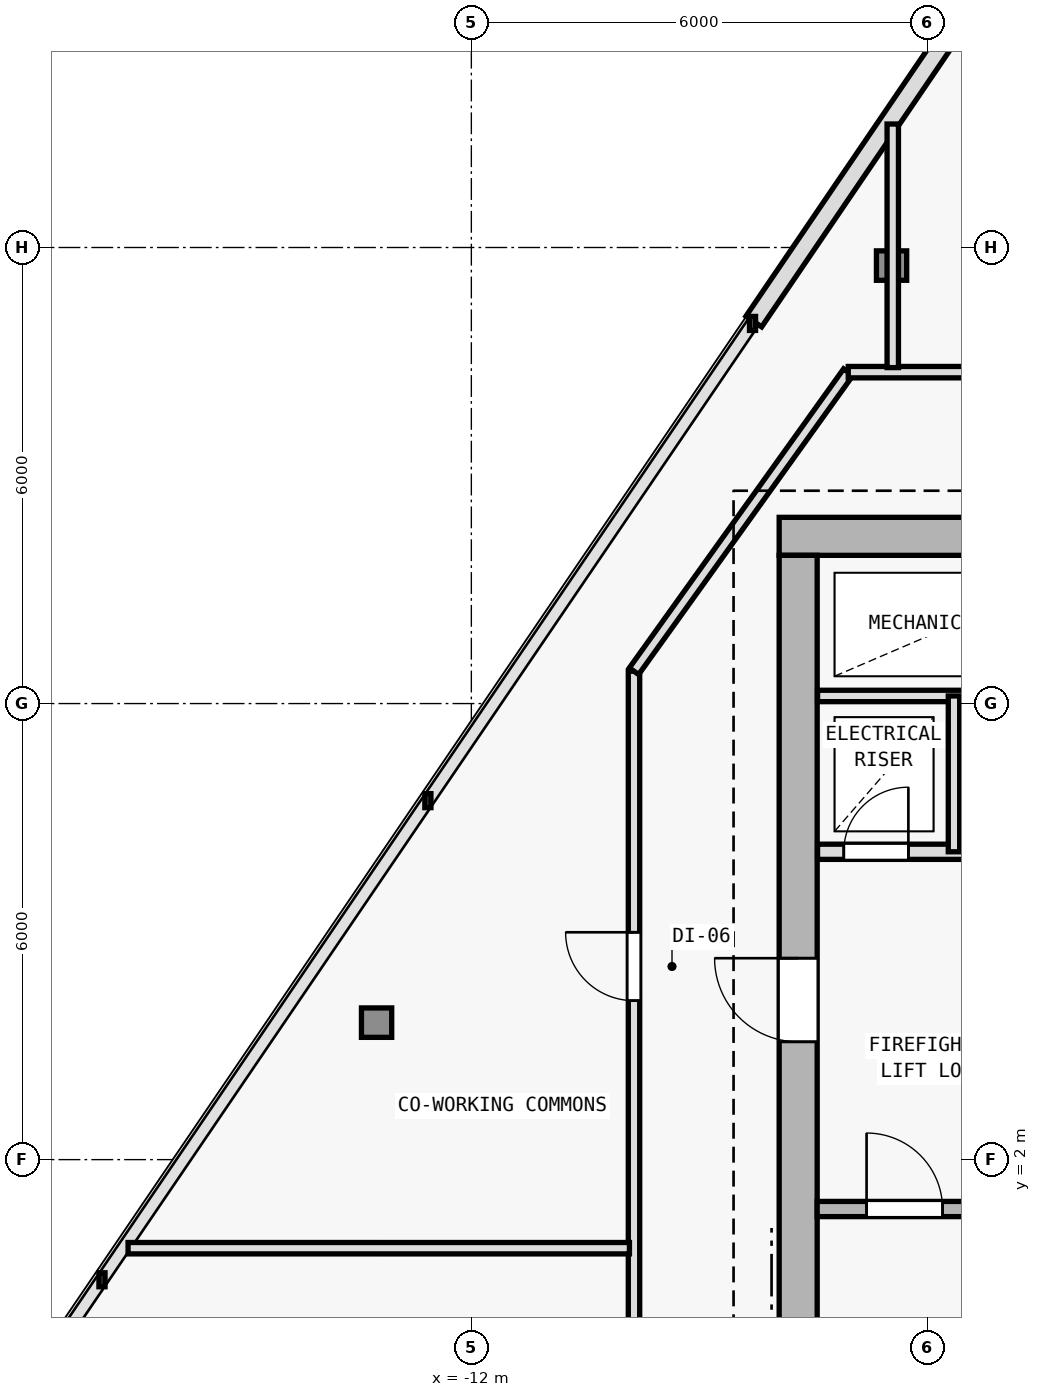
"""IFC4 building model, lengths in metres.
Left out: names, types, materials, properties, quantities, classifications, styles, units other than length and angle.
Written with IfcOpenShell. Run it as: python <this file> out.ifc"""

import sys

from ifc_helpers import new_model, si_unit, direction, frame, frame_2d, origin, origin_2d, place, context, subcontext, project, spatial, rectangle, i_section, extrude, element, fill, save


model = new_model("IFC4")
c1 = context("Model", 3, precision=1e-05, world=origin(), true_north=direction((0.0, 1.0)))
c2 = subcontext(c1, "Body", "Model", "MODEL_VIEW")
j1 = project(units=[si_unit("LENGTHUNIT", "METRE"), si_unit("PLANEANGLEUNIT", "RADIAN")], contexts=[c1])
p1 = place(None, origin())
s1 = spatial("IfcSite", under=j1, at=p1, CompositionType="ELEMENT")
p2 = place(p1, origin())
s2 = spatial("IfcBuilding", under=s1, at=p2, CompositionType="ELEMENT")
p3 = place(p2, frame((0.0, 0.0, 205.5)))
s3 = spatial("IfcBuildingStorey", under=s2, at=p3, CompositionType="ELEMENT", Elevation=205.5)
for number, where, z_axis, x_axis in (
    (1, (-7.7, 10.2, 0.0), (0.0, 0.0, 1.0), (1.0, 0.0, 0.0)),
    (2, (-7.7, 2.0, 0.0), (0.0, 0.0, 1.0), (1.0, 0.0, 0.0)),
):
    element("IfcColumn", number, at=place(p3, frame(where, z_axis=z_axis, x_axis=x_axis)), inside=s3, PredefinedType="COLUMN", context=c2, shape_type="SweptSolid", body=[
        extrude(i_section(OverallWidth=0.398, OverallDepth=0.387, WebThickness=0.013, FlangeThickness=0.022, FilletRadius=0.015, at=origin_2d()), origin(), (0.0, 0.0, 1.0), 3.6),
    ])
p4 = place(p3, frame((-6.471, 13.762, 0.006), z_axis=(0.008775143007, -0.002584925847, 0.999958156636), x_axis=(0.282568886397, 0.959247009086, 0.0)))
e3 = element("IfcColumn", 3, at=p4, inside=s3, PredefinedType="COLUMN", context=c2, shape_type="SweptSolid", body=[
    extrude(i_section(OverallWidth=0.398, OverallDepth=0.387, WebThickness=0.013, FlangeThickness=0.022, FilletRadius=0.015, at=origin_2d()), origin(), (0.0, 0.0, 1.0), 3.589),
])
p5 = place(p3, frame((-13.247, 3.802, 0.006), z_axis=(0.017003572908, 0.009522000828, 0.999810086971), x_axis=(-0.488603368932, 0.87250601595, 0.0)))
e4 = element("IfcColumn", 4, at=p5, inside=s3, PredefinedType="COLUMN", context=c2, shape_type="SweptSolid", body=[
    extrude(i_section(OverallWidth=0.398, OverallDepth=0.387, WebThickness=0.013, FlangeThickness=0.022, FilletRadius=0.015, at=origin_2d()), origin(), (0.0, 0.0, 1.0), 3.59),
])
p6 = place(p3, frame((-8.284, 13.026, 0.0), z_axis=(0.0, 0.0, 1.0), x_axis=(0.562468945091, 0.826818411629, 0.0)))
e5 = element("IfcWall", 5, at=p6, inside=s3, PredefinedType="SOLIDWALL", context=c2, shape_type="SweptSolid", body=[
    extrude(rectangle(XDim=10.714, YDim=0.25, at=frame_2d((5.357, 0.0))), origin(), (0.0, 0.0, 1.0), 3.35),
])
p7 = place(p6, frame((4.557, 0.0, 0.62)))
e6 = element("IfcOpeningElement", 6, at=p7, cuts=e5, PredefinedType="OPENING", context=c2, shape_type="SweptSolid", body=[
    extrude(rectangle(XDim=1.6, YDim=2.1, at=frame_2d((0.8, 1.05))), frame((0.0, 0.135, 0.0), z_axis=(0.0, -1.0, 0.0), x_axis=(1.0, 0.0, 0.0)), (0.0, 0.0, 1.0), 0.27),
])
p8 = place(p3, frame((7.95, 10.2, 0.0), z_axis=(0.0, 0.0, 1.0), x_axis=(-1.0, 0.0, 0.0)))
e7 = element("IfcWall", 7, at=p8, inside=s3, PredefinedType="SHEAR", context=c2, shape_type="SweptSolid", body=[
    extrude(rectangle(XDim=15.9, YDim=0.5, at=frame_2d((7.95, 0.0))), origin(), (0.0, 0.0, 1.0), 3.35),
])
p9 = place(p8, frame((4.4, 0.0, 0.0)))
e8 = element("IfcOpeningElement", 8, at=p9, cuts=e7, PredefinedType="OPENING", context=c2, shape_type="SweptSolid", body=[
    extrude(rectangle(XDim=1.1, YDim=2.15, at=frame_2d((0.55, 1.075))), frame((0.0, 0.26, 0.0), z_axis=(0.0, -1.0, 0.0), x_axis=(1.0, 0.0, 0.0)), (0.0, 0.0, 1.0), 0.52),
])
p10 = place(p3, frame((-7.7, -9.15, 0.0), z_axis=(0.0, 0.0, 1.0), x_axis=(0.0, 1.0, 0.0)))
e9 = element("IfcWall", 9, at=p10, inside=s3, PredefinedType="SHEAR", context=c2, shape_type="SweptSolid", body=[
    extrude(rectangle(XDim=19.1, YDim=0.5, at=frame_2d((9.55, 0.0))), origin(), (0.0, 0.0, 1.0), 3.35),
])
p11 = place(p10, frame((12.7, 0.0, 0.0)))
e10 = element("IfcOpeningElement", 10, at=p11, cuts=e9, PredefinedType="OPENING", context=c2, shape_type="SweptSolid", body=[
    extrude(rectangle(XDim=1.1, YDim=2.15, at=frame_2d((0.55, 1.075))), frame((0.0, 0.26, 0.0), z_axis=(0.0, -1.0, 0.0), x_axis=(1.0, 0.0, 0.0)), (0.0, 0.0, 1.0), 0.52),
])
p12 = place(p3, frame((-7.45, 1.35, 0.0), z_axis=(0.0, 0.0, 1.0), x_axis=(1.0, 0.0, 0.0)))
e11 = element("IfcWall", 11, at=p12, inside=s3, PredefinedType="SOLIDWALL", context=c2, shape_type="SweptSolid", body=[
    extrude(rectangle(XDim=3.4, YDim=0.2, at=frame_2d((1.7, 0.0))), origin(), (0.0, 0.0, 1.0), 3.35),
])
p13 = place(p12, frame((0.65, 0.0, 0.0)))
e12 = element("IfcOpeningElement", 12, at=p13, cuts=e11, PredefinedType="OPENING", context=c2, shape_type="SweptSolid", body=[
    extrude(rectangle(XDim=1.0, YDim=2.15, at=frame_2d((0.5, 1.075))), frame((0.0, 0.11, 0.0), z_axis=(0.0, -1.0, 0.0), x_axis=(1.0, 0.0, 0.0)), (0.0, 0.0, 1.0), 0.22),
])
p14 = place(p3, frame((-7.445, 6.05, 0.0), z_axis=(0.0, 0.0, 1.0), x_axis=(1.0, 0.0, 0.0)))
e13 = element("IfcWall", 13, at=p14, inside=s3, PredefinedType="SOLIDWALL", context=c2, shape_type="SweptSolid", body=[
    extrude(rectangle(XDim=3.595, YDim=0.2, at=frame_2d((1.797, 0.0))), origin(), (0.0, 0.0, 1.0), 3.35),
])
p15 = place(p14, frame((0.345, 0.0, 0.0)))
e14 = element("IfcOpeningElement", 14, at=p15, cuts=e13, PredefinedType="OPENING", context=c2, shape_type="SweptSolid", body=[
    extrude(rectangle(XDim=0.85, YDim=2.1, at=frame_2d((0.425, 1.05))), frame((0.0, 0.11, 0.0), z_axis=(0.0, -1.0, 0.0), x_axis=(1.0, 0.0, 0.0)), (0.0, 0.0, 1.0), 0.22),
])
p16 = place(p14, frame((2.145, 0.0, 0.0)))
e15 = element("IfcOpeningElement", 15, at=p16, cuts=e13, PredefinedType="OPENING", context=c2, shape_type="SweptSolid", body=[
    extrude(rectangle(XDim=0.85, YDim=2.1, at=frame_2d((0.425, 1.05))), frame((0.0, 0.11, 0.0), z_axis=(0.0, -1.0, 0.0), x_axis=(1.0, 0.0, 0.0)), (0.0, 0.0, 1.0), 0.22),
])
p17 = place(p3, frame((-7.445, 8.1, 0.0), z_axis=(0.0, 0.0, 1.0), x_axis=(1.0, 0.0, 0.0)))
e16 = element("IfcWall", 16, at=p17, inside=s3, PredefinedType="PARTITIONING", context=c2, shape_type="SweptSolid", body=[
    extrude(rectangle(XDim=3.595, YDim=0.15, at=frame_2d((1.797, 0.0))), origin(), (0.0, 0.0, 1.0), 3.35),
])
p18 = place(p3, frame((-5.65, 6.05, 0.0), z_axis=(0.0, 0.0, 1.0), x_axis=(0.0, 1.0, 0.0)))
e17 = element("IfcWall", 17, at=p18, inside=s3, PredefinedType="PARTITIONING", context=c2, shape_type="SweptSolid", body=[
    extrude(rectangle(XDim=2.05, YDim=0.15, at=frame_2d((1.025, 0.0))), origin(), (0.0, 0.0, 1.0), 3.35),
])
p19 = place(p3, frame((-9.86, -11.56, 0.0), z_axis=(0.0, 0.0, 1.0), x_axis=(0.0, 1.0, 0.0)))
e18 = element("IfcWall", 18, at=p19, inside=s3, PredefinedType="PARTITIONING", context=c2, shape_type="SweptSolid", body=[
    extrude(rectangle(XDim=19.986, YDim=0.15, at=frame_2d((9.993, 0.0))), origin(), (0.0, 0.0, 1.0), 2.825),
])
p20 = place(p19, frame((8.468, 0.0, 0.0)))
e19 = element("IfcOpeningElement", 19, at=p20, cuts=e18, PredefinedType="OPENING", context=c2, shape_type="SweptSolid", body=[
    extrude(rectangle(XDim=0.9, YDim=2.1, at=frame_2d((0.45, 1.05))), frame((0.0, 0.085, 0.0), z_axis=(0.0, -1.0, 0.0), x_axis=(1.0, 0.0, 0.0)), (0.0, 0.0, 1.0), 0.17),
])
p21 = place(p19, frame((4.38, 0.0, 0.0)))
e20 = element("IfcOpeningElement", 20, at=p21, cuts=e18, PredefinedType="OPENING", context=c2, shape_type="SweptSolid", body=[
    extrude(rectangle(XDim=0.85, YDim=2.1, at=frame_2d((0.425, 1.05))), frame((0.0, 0.085, 0.0), z_axis=(0.0, -1.0, 0.0), x_axis=(1.0, 0.0, 0.0)), (0.0, 0.0, 1.0), 0.17),
])
p22 = place(p19, frame((3.071, 0.0, 0.0)))
e21 = element("IfcOpeningElement", 21, at=p22, cuts=e18, PredefinedType="OPENING", context=c2, shape_type="SweptSolid", body=[
    extrude(rectangle(XDim=0.85, YDim=2.1, at=frame_2d((0.425, 1.05))), frame((0.0, 0.085, 0.0), z_axis=(0.0, -1.0, 0.0), x_axis=(1.0, 0.0, 0.0)), (0.0, 0.0, 1.0), 0.17),
])
p23 = place(p19, frame((1.051, 0.0, 0.0)))
e22 = element("IfcOpeningElement", 22, at=p23, cuts=e18, PredefinedType="OPENING", context=c2, shape_type="SweptSolid", body=[
    extrude(rectangle(XDim=0.9, YDim=2.1, at=frame_2d((0.45, 1.05))), frame((0.0, 0.085, 0.0), z_axis=(0.0, -1.0, 0.0), x_axis=(1.0, 0.0, 0.0)), (0.0, 0.0, 1.0), 0.17),
])
p24 = place(p19, frame((15.651, 0.0, 0.0)))
e23 = element("IfcOpeningElement", 23, at=p24, cuts=e18, PredefinedType="OPENING", context=c2, shape_type="SweptSolid", body=[
    extrude(rectangle(XDim=0.9, YDim=2.1, at=frame_2d((0.45, 1.05))), frame((0.0, 0.085, 0.0), z_axis=(0.0, -1.0, 0.0), x_axis=(1.0, 0.0, 0.0)), (0.0, 0.0, 1.0), 0.17),
])
p25 = place(p3, frame((-9.86, 8.426, 0.0), z_axis=(0.0, 0.0, 1.0), x_axis=(0.582449511476, 0.812866881218, 0.0)))
e24 = element("IfcWall", 24, at=p25, inside=s3, PredefinedType="PARTITIONING", context=c2, shape_type="SweptSolid", body=[
    extrude(rectangle(XDim=4.84, YDim=0.15, at=frame_2d((2.42, 0.0))), origin(), (0.0, 0.0, 1.0), 2.975),
])
p26 = place(p3, frame((-7.041, 12.36, 0.0), z_axis=(0.0, 0.0, 1.0), x_axis=(1.0, 0.0, 0.0)))
e25 = element("IfcWall", 25, at=p26, inside=s3, PredefinedType="PARTITIONING", context=c2, shape_type="SweptSolid", body=[
    extrude(rectangle(XDim=14.064, YDim=0.15, at=frame_2d((7.032, 0.0))), origin(), (0.0, 0.0, 1.0), 2.975),
])
p27 = place(p26, frame((12.272, 0.0, 0.0)))
e26 = element("IfcOpeningElement", 26, at=p27, cuts=e25, PredefinedType="OPENING", context=c2, shape_type="SweptSolid", body=[
    extrude(rectangle(XDim=0.9, YDim=2.1, at=frame_2d((0.45, 1.05))), frame((0.0, 0.085, 0.0), z_axis=(0.0, -1.0, 0.0), x_axis=(1.0, 0.0, 0.0)), (0.0, 0.0, 1.0), 0.17),
])
p28 = place(p26, frame((9.449, 0.0, 0.0)))
e27 = element("IfcOpeningElement", 27, at=p28, cuts=e25, PredefinedType="OPENING", context=c2, shape_type="SweptSolid", body=[
    extrude(rectangle(XDim=0.9, YDim=2.1, at=frame_2d((0.45, 1.05))), frame((0.0, 0.085, 0.0), z_axis=(0.0, -1.0, 0.0), x_axis=(1.0, 0.0, 0.0)), (0.0, 0.0, 1.0), 0.17),
])
p29 = place(p26, frame((6.614, 0.0, 0.0)))
e28 = element("IfcOpeningElement", 28, at=p29, cuts=e25, PredefinedType="OPENING", context=c2, shape_type="SweptSolid", body=[
    extrude(rectangle(XDim=0.9, YDim=2.1, at=frame_2d((0.45, 1.05))), frame((0.0, 0.085, 0.0), z_axis=(0.0, -1.0, 0.0), x_axis=(1.0, 0.0, 0.0)), (0.0, 0.0, 1.0), 0.17),
])
p30 = place(p26, frame((2.786, 0.0, 0.0)))
e29 = element("IfcOpeningElement", 29, at=p30, cuts=e25, PredefinedType="OPENING", context=c2, shape_type="SweptSolid", body=[
    extrude(rectangle(XDim=0.9, YDim=2.1, at=frame_2d((0.45, 1.05))), frame((0.0, 0.085, 0.0), z_axis=(0.0, -1.0, 0.0), x_axis=(1.0, 0.0, 0.0)), (0.0, 0.0, 1.0), 0.17),
])
p31 = place(p3, frame((-6.456, 12.42, 0.0), z_axis=(0.0, 0.0, 1.0), x_axis=(0.0, 1.0, 0.0)))
e30 = element("IfcWall", 30, at=p31, inside=s3, PredefinedType="PARTITIONING", context=c2, shape_type="SweptSolid", body=[
    extrude(rectangle(XDim=3.205, YDim=0.15, at=frame_2d((1.602, 0.0))), origin(), (0.0, 0.0, 1.0), 2.975),
])
p32 = place(p3, frame((-9.92, 0.835, 0.0), z_axis=(0.0, 0.0, 1.0), x_axis=(-1.0, 0.0, 0.0)))
e31 = element("IfcWall", 31, at=p32, inside=s3, PredefinedType="PARTITIONING", context=c2, shape_type="SweptSolid", body=[
    extrude(rectangle(XDim=6.597, YDim=0.15, at=frame_2d((3.298, 0.0))), origin(), (0.0, 0.0, 1.0), 2.775),
])
p33 = place(p11, origin())
e32 = element("IfcDoor", 32, at=p33, inside=s3, OperationType="SINGLE_SWING_RIGHT", PredefinedType="DOOR", context=c2, shape_type="SweptSolid", body=[
    extrude(rectangle(XDim=1.1, YDim=2.15, at=frame_2d((0.55, 1.075))), frame((0.0, 0.025, 0.0), z_axis=(0.0, -1.0, 0.0), x_axis=(1.0, 0.0, 0.0)), (0.0, 0.0, 1.0), 0.05),
])
fill(e10, e32)
p34 = place(p13, origin())
e33 = element("IfcDoor", 33, at=p34, inside=s3, OperationType="SINGLE_SWING_LEFT", PredefinedType="DOOR", context=c2, shape_type="SweptSolid", body=[
    extrude(rectangle(XDim=1.0, YDim=2.15, at=frame_2d((0.5, 1.075))), frame((0.0, 0.025, 0.0), z_axis=(0.0, -1.0, 0.0), x_axis=(1.0, 0.0, 0.0)), (0.0, 0.0, 1.0), 0.05),
])
fill(e12, e33)
p35 = place(p15, origin())
e34 = element("IfcDoor", 34, at=p35, inside=s3, OperationType="SINGLE_SWING_RIGHT", PredefinedType="DOOR", context=c2, shape_type="SweptSolid", body=[
    extrude(rectangle(XDim=0.85, YDim=2.1, at=frame_2d((0.425, 1.05))), frame((0.0, 0.025, 0.0), z_axis=(0.0, -1.0, 0.0), x_axis=(1.0, 0.0, 0.0)), (0.0, 0.0, 1.0), 0.05),
])
fill(e14, e34)
p36 = place(p24, origin())
e35 = element("IfcDoor", 35, at=p36, inside=s3, OperationType="SINGLE_SWING_RIGHT", PredefinedType="DOOR", context=c2, shape_type="SweptSolid", body=[
    extrude(rectangle(XDim=0.9, YDim=2.1, at=frame_2d((0.45, 1.05))), frame((0.0, 0.025, 0.0), z_axis=(0.0, -1.0, 0.0), x_axis=(1.0, 0.0, 0.0)), (0.0, 0.0, 1.0), 0.05),
])
fill(e23, e35)
save(model, sys.argv[1])
